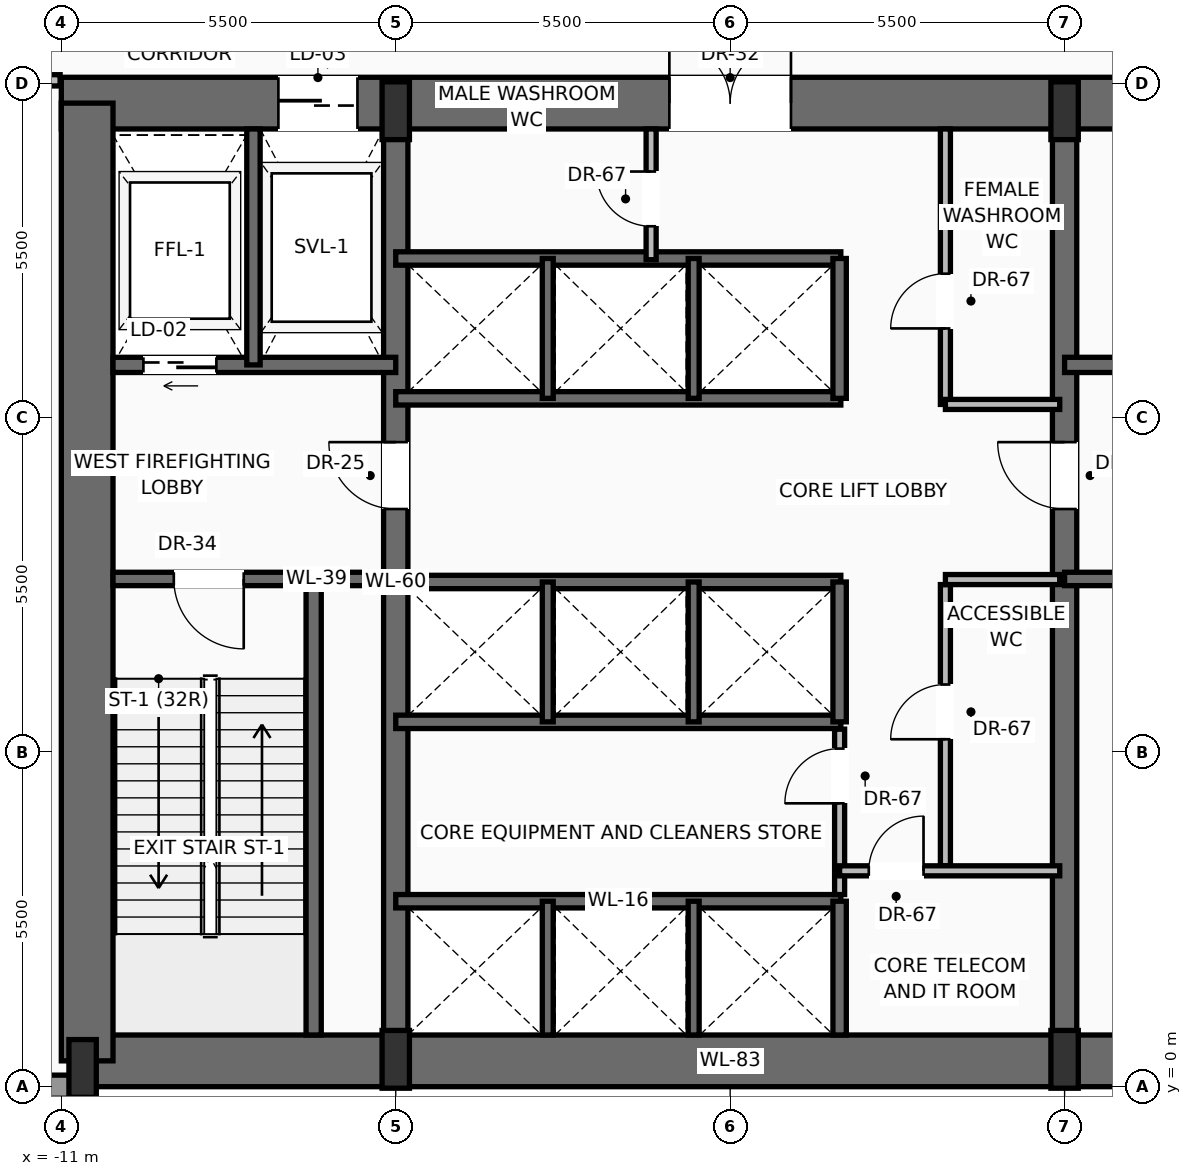
"""IFC4 building model, lengths in metres.
Left out: names, types, materials, properties, quantities, classifications, styles, units other than length and angle.
Written with IfcOpenShell. Run it as: python <this file> out.ifc"""

import sys

from ifc_helpers import new_model, si_unit, direction, frame, frame_2d, origin, origin_2d, place, context, subcontext, project, spatial, rectangle, extrude, source, transform, mapped, element, fill, save


model = new_model("IFC4")
c1 = context("Model", 3, precision=1e-05, world=origin(), true_north=direction((0.0, 1.0)))
c2 = subcontext(c1, "Body", "Model", "MODEL_VIEW")
j1 = project(units=[si_unit("LENGTHUNIT", "METRE"), si_unit("PLANEANGLEUNIT", "RADIAN")], contexts=[c1])
p1 = place(None, origin())
s1 = spatial("IfcSite", under=j1, at=p1, CompositionType="ELEMENT")
p2 = place(p1, origin())
s2 = spatial("IfcBuilding", under=s1, at=p2, CompositionType="ELEMENT")
p3 = place(p2, frame((0.0, 0.0, 11.0)))
s3 = spatial("IfcBuildingStorey", under=s2, at=p3, CompositionType="ELEMENT", Elevation=11.0)
p4 = place(p3, frame((-10.65, 0.425, 0.0), z_axis=(0.0, 0.0, 1.0), x_axis=(1.0, 0.0, 0.0)))
e1 = element("IfcWall", 1, at=p4, inside=s3, PredefinedType="SHEAR", context=c2, shape_type="SweptSolid", body=[
    extrude(rectangle(XDim=21.3, YDim=0.85, at=frame_2d((10.65, 0.0))), origin(), (0.0, 0.0, 1.0), 5.185),
])
p5 = place(p3, frame((-11.0, 16.175, 0.0), z_axis=(0.0, 0.0, 1.0), x_axis=(1.0, 0.0, 0.0)))
e2 = element("IfcWall", 2, at=p5, inside=s3, PredefinedType="SHEAR", context=c2, shape_type="SweptSolid", body=[
    extrude(rectangle(XDim=22.0, YDim=0.85, at=frame_2d((11.0, 0.0))), origin(), (0.0, 0.0, 1.0), 5.185),
])
p6 = place(p5, frame((3.57, 0.0, 0.0)))
e3 = element("IfcOpeningElement", 3, at=p6, cuts=e2, PredefinedType="OPENING", context=c2, shape_type="SweptSolid", body=[
    extrude(rectangle(XDim=1.3, YDim=2.3, at=frame_2d((0.65, 1.15))), frame((0.0, 0.435, 0.0), z_axis=(0.0, -1.0, 0.0), x_axis=(1.0, 0.0, 0.0)), (0.0, 0.0, 1.0), 0.87),
])
p7 = place(p5, frame((10.0, 0.0, 0.0)))
e4 = element("IfcOpeningElement", 4, at=p7, cuts=e2, PredefinedType="OPENING", context=c2, shape_type="SweptSolid", body=[
    extrude(rectangle(XDim=2.0, YDim=2.4, at=frame_2d((1.0, 1.2))), frame((0.0, 0.435, 0.0), z_axis=(0.0, -1.0, 0.0), x_axis=(1.0, 0.0, 0.0)), (0.0, 0.0, 1.0), 0.87),
])
p8 = place(p3, frame((-10.575, 0.425, 0.0), z_axis=(0.0, 0.0, 1.0), x_axis=(0.0, 1.0, 0.0)))
e5 = element("IfcWall", 5, at=p8, inside=s3, PredefinedType="SHEAR", context=c2, shape_type="SweptSolid", body=[
    extrude(rectangle(XDim=15.75, YDim=0.85, at=frame_2d((7.875, 0.0))), origin(), (0.0, 0.0, 1.0), 5.185),
])
p9 = place(p3, frame((-5.5, 0.425, 0.0), z_axis=(0.0, 0.0, 1.0), x_axis=(0.0, 1.0, 0.0)))
e6 = element("IfcWall", 6, at=p9, inside=s3, PredefinedType="SHEAR", context=c2, shape_type="SweptSolid", body=[
    extrude(rectangle(XDim=15.75, YDim=0.4, at=frame_2d((7.875, 0.0))), origin(), (0.0, 0.0, 1.0), 5.185),
])
p10 = place(p9, frame((9.075, 0.0, 0.0)))
e7 = element("IfcOpeningElement", 7, at=p10, cuts=e6, PredefinedType="OPENING", context=c2, shape_type="SweptSolid", body=[
    extrude(rectangle(XDim=1.1, YDim=2.2, at=frame_2d((0.55, 1.1))), frame((0.0, 0.21, 0.0), z_axis=(0.0, -1.0, 0.0), x_axis=(1.0, 0.0, 0.0)), (0.0, 0.0, 1.0), 0.42),
])
p11 = place(p3, frame((5.5, 0.425, 0.0), z_axis=(0.0, 0.0, 1.0), x_axis=(0.0, 1.0, 0.0)))
e8 = element("IfcWall", 8, at=p11, inside=s3, PredefinedType="SHEAR", context=c2, shape_type="SweptSolid", body=[
    extrude(rectangle(XDim=15.75, YDim=0.4, at=frame_2d((7.875, 0.0))), origin(), (0.0, 0.0, 1.0), 5.185),
])
p12 = place(p11, frame((9.075, 0.0, 0.0)))
e9 = element("IfcOpeningElement", 9, at=p12, cuts=e8, PredefinedType="OPENING", context=c2, shape_type="SweptSolid", body=[
    extrude(rectangle(XDim=1.1, YDim=2.2, at=frame_2d((0.55, 1.1))), frame((0.0, 0.21, 0.0), z_axis=(0.0, -1.0, 0.0), x_axis=(1.0, 0.0, 0.0)), (0.0, 0.0, 1.0), 0.42),
])
m1 = source(origin(), c2, "Body", "SweptSolid", [
    extrude(rectangle(XDim=0.45, YDim=0.95, at=origin_2d()), origin(), (0.0, 0.0, 1.0), 5.5),
])
for number, where, z_axis, x_axis in (
    (10, (-10.65, 0.3, 0.0), (0.0, 0.0, 1.0), (1.0, 0.0, 0.0)),
    (11, (-5.5, 0.45, 0.0), (0.0, 0.0, 1.0), (1.0, 0.0, 0.0)),
    (12, (5.5, 0.45, 0.0), (0.0, 0.0, 1.0), (1.0, 0.0, 0.0)),
    (13, (-5.5, 16.05, 0.0), (0.0, 0.0, 1.0), (1.0, 0.0, 0.0)),
    (14, (5.5, 16.05, 0.0), (0.0, 0.0, 1.0), (1.0, 0.0, 0.0)),
):
    element("IfcColumn", number, at=place(p3, frame(where, z_axis=z_axis, x_axis=x_axis)), inside=s3, PredefinedType="PILASTER", context=c2, shape_type="MappedRepresentation", body=[
        mapped(m1, transform((0.0, 0.0, 0.0), scale=1.0)),
    ])
p13 = place(p3, frame((-10.55, 0.0, 0.0), z_axis=(0.0, 0.0, 1.0), x_axis=(-1.0, 0.0, 0.0)))
e15 = element("IfcWall", 15, at=p13, inside=s3, PredefinedType="SOLIDWALL", context=c2, shape_type="SweptSolid", body=[
    extrude(rectangle(XDim=16.85, YDim=0.38, at=frame_2d((8.425, 0.0))), origin(), (0.0, 0.0, 1.0), 4.125),
])
p14 = place(p13, frame((7.525, 0.0, 0.95)))
e16 = element("IfcOpeningElement", 16, at=p14, cuts=e15, PredefinedType="OPENING", context=c2, shape_type="SweptSolid", body=[
    extrude(rectangle(XDim=1.8, YDim=2.4, at=frame_2d((0.9, 1.2))), frame((0.0, 0.2, 0.0), z_axis=(0.0, -1.0, 0.0), x_axis=(1.0, 0.0, 0.0)), (0.0, 0.0, 1.0), 0.4),
])
p15 = place(p3, frame((-6.85, 0.85, 0.0), z_axis=(0.0, 0.0, 1.0), x_axis=(0.0, 1.0, 0.0)))
e17 = element("IfcWall", 17, at=p15, inside=s3, PredefinedType="SOLIDWALL", context=c2, shape_type="SweptSolid", body=[
    extrude(rectangle(XDim=7.5, YDim=0.25, at=frame_2d((3.75, 0.0))), origin(), (0.0, 0.0, 1.0), 5.185),
])
p16 = place(p3, frame((-5.5, 8.35, 0.0), z_axis=(0.0, 0.0, 1.0), x_axis=(-1.0, 0.0, 0.0)))
e18 = element("IfcWall", 18, at=p16, inside=s3, PredefinedType="SOLIDWALL", context=c2, shape_type="SweptSolid", body=[
    extrude(rectangle(XDim=4.65, YDim=0.22, at=frame_2d((2.325, 0.0))), origin(), (0.0, 0.0, 1.0), 5.185),
])
p17 = place(p16, frame((2.5, 0.0, 0.0)))
e19 = element("IfcOpeningElement", 19, at=p17, cuts=e18, PredefinedType="OPENING", context=c2, shape_type="SweptSolid", body=[
    extrude(rectangle(XDim=1.15, YDim=2.2, at=frame_2d((0.575, 1.1))), frame((0.0, 0.12, 0.0), z_axis=(0.0, -1.0, 0.0), x_axis=(1.0, 0.0, 0.0)), (0.0, 0.0, 1.0), 0.24),
])
p18 = place(p3, frame((-5.5, 11.87, 0.0), z_axis=(0.0, 0.0, 1.0), x_axis=(-1.0, 0.0, 0.0)))
e20 = element("IfcWall", 20, at=p18, inside=s3, PredefinedType="SOLIDWALL", context=c2, shape_type="SweptSolid", body=[
    extrude(rectangle(XDim=4.65, YDim=0.25, at=frame_2d((2.325, 0.0))), origin(), (0.0, 0.0, 1.0), 5.185),
])
p19 = place(p18, frame((2.95, 0.0, 0.0)))
e21 = element("IfcOpeningElement", 21, at=p19, cuts=e20, PredefinedType="OPENING", context=c2, shape_type="SweptSolid", body=[
    extrude(rectangle(XDim=1.2, YDim=2.25, at=frame_2d((0.6, 1.125))), frame((0.0, 0.135, 0.0), z_axis=(0.0, -1.0, 0.0), x_axis=(1.0, 0.0, 0.0)), (0.0, 0.0, 1.0), 0.27),
])
p20 = place(p3, frame((-7.84, 11.87, 0.0), z_axis=(0.0, 0.0, 1.0), x_axis=(0.0, 1.0, 0.0)))
e22 = element("IfcWall", 22, at=p20, inside=s3, PredefinedType="SOLIDWALL", context=c2, shape_type="SweptSolid", body=[
    extrude(rectangle(XDim=3.88, YDim=0.22, at=frame_2d((1.94, 0.0))), origin(), (0.0, 0.0, 1.0), 5.185),
])
p21 = place(p3, frame((10.15, 8.35, 0.0), z_axis=(0.0, 0.0, 1.0), x_axis=(-1.0, 0.0, 0.0)))
e23 = element("IfcWall", 23, at=p21, inside=s3, PredefinedType="SOLIDWALL", context=c2, shape_type="SweptSolid", body=[
    extrude(rectangle(XDim=4.65, YDim=0.22, at=frame_2d((2.325, 0.0))), origin(), (0.0, 0.0, 1.0), 5.185),
])
p22 = place(p21, frame((1.0, 0.0, 0.0)))
e24 = element("IfcOpeningElement", 24, at=p22, cuts=e23, PredefinedType="OPENING", context=c2, shape_type="SweptSolid", body=[
    extrude(rectangle(XDim=1.15, YDim=2.2, at=frame_2d((0.575, 1.1))), frame((0.0, 0.12, 0.0), z_axis=(0.0, -1.0, 0.0), x_axis=(1.0, 0.0, 0.0)), (0.0, 0.0, 1.0), 0.24),
])
p23 = place(p3, frame((10.15, 11.87, 0.0), z_axis=(0.0, 0.0, 1.0), x_axis=(-1.0, 0.0, 0.0)))
e25 = element("IfcWall", 25, at=p23, inside=s3, PredefinedType="SOLIDWALL", context=c2, shape_type="SweptSolid", body=[
    extrude(rectangle(XDim=4.65, YDim=0.25, at=frame_2d((2.325, 0.0))), origin(), (0.0, 0.0, 1.0), 5.185),
])
p24 = place(p23, frame((0.5, 0.0, 0.0)))
e26 = element("IfcOpeningElement", 26, at=p24, cuts=e25, PredefinedType="OPENING", context=c2, shape_type="SweptSolid", body=[
    extrude(rectangle(XDim=1.2, YDim=2.25, at=frame_2d((0.6, 1.125))), frame((0.0, 0.135, 0.0), z_axis=(0.0, -1.0, 0.0), x_axis=(1.0, 0.0, 0.0)), (0.0, 0.0, 1.0), 0.27),
])
p25 = place(p3, frame((-5.5, 3.05, 0.0), z_axis=(0.0, 0.0, 1.0), x_axis=(1.0, 0.0, 0.0)))
e27 = element("IfcWall", 27, at=p25, inside=s3, PredefinedType="SOLIDWALL", context=c2, shape_type="SweptSolid", body=[
    extrude(rectangle(XDim=7.32, YDim=0.22, at=frame_2d((3.66, 0.0))), origin(), (0.0, 0.0, 1.0), 5.185),
])
p26 = place(p3, frame((1.8, 0.85, 0.0), z_axis=(0.0, 0.0, 1.0), x_axis=(0.0, 1.0, 0.0)))
e28 = element("IfcWall", 28, at=p26, inside=s3, PredefinedType="SOLIDWALL", context=c2, shape_type="SweptSolid", body=[
    extrude(rectangle(XDim=2.2, YDim=0.22, at=frame_2d((1.1, 0.0))), origin(), (0.0, 0.0, 1.0), 5.185),
])
for number, where, z_axis, x_axis in (
    (29, (-3.0, 0.85, 0.0), (0.0, 0.0, 1.0), (0.0, 1.0, 0.0)),
    (30, (-0.6, 0.85, 0.0), (0.0, 0.0, 1.0), (0.0, 1.0, 0.0)),
):
    element("IfcWall", number, at=place(p3, frame(where, z_axis=z_axis, x_axis=x_axis)), inside=s3, PredefinedType="SOLIDWALL", context=c2, shape_type="SweptSolid", body=[
        extrude(rectangle(XDim=2.2, YDim=0.18, at=frame_2d((1.1, 0.0))), origin(), (0.0, 0.0, 1.0), 5.185),
    ])
p27 = place(p3, frame((1.8, 3.16, 0.0), z_axis=(0.0, 0.0, 1.0), x_axis=(0.0, 1.0, 0.0)))
e31 = element("IfcWall", 31, at=p27, inside=s3, PredefinedType="PARTITIONING", context=c2, shape_type="SweptSolid", body=[
    extrude(rectangle(XDim=2.72, YDim=0.165, at=frame_2d((1.36, 0.0))), origin(), (0.0, 0.0, 1.0), 5.177),
])
p28 = place(p27, frame((1.5, 0.0, 0.0)))
e32 = element("IfcOpeningElement", 32, at=p28, cuts=e31, PredefinedType="OPENING", context=c2, shape_type="SweptSolid", body=[
    extrude(rectangle(XDim=0.9, YDim=2.1, at=frame_2d((0.45, 1.05))), frame((0.0, 0.093, 0.0), z_axis=(0.0, -1.0, 0.0), x_axis=(1.0, 0.0, 0.0)), (0.0, 0.0, 1.0), 0.185),
])
p29 = place(p3, frame((3.54, 3.633, 0.0), z_axis=(0.0, 0.0, 1.0), x_axis=(0.0, 1.0, 0.0)))
e33 = element("IfcWall", 33, at=p29, inside=s3, PredefinedType="PARTITIONING", context=c2, shape_type="SweptSolid", body=[
    extrude(rectangle(XDim=4.625, YDim=0.165, at=frame_2d((2.312, 0.0))), origin(), (0.0, 0.0, 1.0), 5.177),
])
p30 = place(p29, frame((2.081, 0.0, 0.0)))
e34 = element("IfcOpeningElement", 34, at=p30, cuts=e33, PredefinedType="OPENING", context=c2, shape_type="SweptSolid", body=[
    extrude(rectangle(XDim=0.9, YDim=2.1, at=frame_2d((0.45, 1.05))), frame((0.0, 0.093, 0.0), z_axis=(0.0, -1.0, 0.0), x_axis=(1.0, 0.0, 0.0)), (0.0, 0.0, 1.0), 0.185),
])
p31 = place(p3, frame((3.54, 8.34, 0.0), z_axis=(0.0, 0.0, 1.0), x_axis=(1.0, 0.0, 0.0)))
e35 = element("IfcWall", 35, at=p31, inside=s3, PredefinedType="PARTITIONING", context=c2, shape_type="SweptSolid", body=[
    extrude(rectangle(XDim=1.88, YDim=0.165, at=frame_2d((0.94, 0.0))), origin(), (0.0, 0.0, 1.0), 5.177),
])
p32 = place(p3, frame((1.8, 3.55, 0.0), z_axis=(0.0, 0.0, 1.0), x_axis=(1.0, 0.0, 0.0)))
e36 = element("IfcWall", 36, at=p32, inside=s3, PredefinedType="PARTITIONING", context=c2, shape_type="SweptSolid", body=[
    extrude(rectangle(XDim=3.62, YDim=0.165, at=frame_2d((1.81, 0.0))), origin(), (0.0, 0.0, 1.0), 5.177),
])
p33 = place(p32, frame((0.48, 0.0, 0.0)))
e37 = element("IfcOpeningElement", 37, at=p33, cuts=e36, PredefinedType="OPENING", context=c2, shape_type="SweptSolid", body=[
    extrude(rectangle(XDim=0.9, YDim=2.1, at=frame_2d((0.45, 1.05))), frame((0.0, 0.093, 0.0), z_axis=(0.0, -1.0, 0.0), x_axis=(1.0, 0.0, 0.0)), (0.0, 0.0, 1.0), 0.185),
])
for number, where, z_axis, x_axis in (
    (38, (-5.5, 6.0, 0.0), (0.0, 0.0, 1.0), (1.0, 0.0, 0.0)),
    (39, (-5.5, 8.3, 0.0), (0.0, 0.0, 1.0), (1.0, 0.0, 0.0)),
):
    element("IfcWall", number, at=place(p3, frame(where, z_axis=z_axis, x_axis=x_axis)), inside=s3, PredefinedType="SOLIDWALL", context=c2, shape_type="SweptSolid", body=[
        extrude(rectangle(XDim=7.32, YDim=0.22, at=frame_2d((3.66, 0.0))), origin(), (0.0, 0.0, 1.0), 5.185),
    ])
p34 = place(p3, frame((1.8, 6.0, 0.0), z_axis=(0.0, 0.0, 1.0), x_axis=(0.0, 1.0, 0.0)))
e40 = element("IfcWall", 40, at=p34, inside=s3, PredefinedType="SOLIDWALL", context=c2, shape_type="SweptSolid", body=[
    extrude(rectangle(XDim=2.3, YDim=0.22, at=frame_2d((1.15, 0.0))), origin(), (0.0, 0.0, 1.0), 5.185),
])
for number, where, z_axis, x_axis in (
    (41, (-3.0, 6.0, 0.0), (0.0, 0.0, 1.0), (0.0, 1.0, 0.0)),
    (42, (-0.6, 6.0, 0.0), (0.0, 0.0, 1.0), (0.0, 1.0, 0.0)),
):
    element("IfcWall", number, at=place(p3, frame(where, z_axis=z_axis, x_axis=x_axis)), inside=s3, PredefinedType="SOLIDWALL", context=c2, shape_type="SweptSolid", body=[
        extrude(rectangle(XDim=2.3, YDim=0.18, at=frame_2d((1.15, 0.0))), origin(), (0.0, 0.0, 1.0), 5.185),
    ])
for number, where, z_axis, x_axis in (
    (43, (-5.5, 11.32, 0.0), (0.0, 0.0, 1.0), (1.0, 0.0, 0.0)),
    (44, (-5.5, 13.62, 0.0), (0.0, 0.0, 1.0), (1.0, 0.0, 0.0)),
):
    element("IfcWall", number, at=place(p3, frame(where, z_axis=z_axis, x_axis=x_axis)), inside=s3, PredefinedType="SOLIDWALL", context=c2, shape_type="SweptSolid", body=[
        extrude(rectangle(XDim=7.32, YDim=0.22, at=frame_2d((3.66, 0.0))), origin(), (0.0, 0.0, 1.0), 5.185),
    ])
p35 = place(p3, frame((1.8, 11.32, 0.0), z_axis=(0.0, 0.0, 1.0), x_axis=(0.0, 1.0, 0.0)))
e45 = element("IfcWall", 45, at=p35, inside=s3, PredefinedType="SOLIDWALL", context=c2, shape_type="SweptSolid", body=[
    extrude(rectangle(XDim=2.3, YDim=0.22, at=frame_2d((1.15, 0.0))), origin(), (0.0, 0.0, 1.0), 5.185),
])
for number, where, z_axis, x_axis in (
    (46, (-3.0, 11.32, 0.0), (0.0, 0.0, 1.0), (0.0, 1.0, 0.0)),
    (47, (-0.6, 11.32, 0.0), (0.0, 0.0, 1.0), (0.0, 1.0, 0.0)),
):
    element("IfcWall", number, at=place(p3, frame(where, z_axis=z_axis, x_axis=x_axis)), inside=s3, PredefinedType="SOLIDWALL", context=c2, shape_type="SweptSolid", body=[
        extrude(rectangle(XDim=2.3, YDim=0.18, at=frame_2d((1.15, 0.0))), origin(), (0.0, 0.0, 1.0), 5.185),
    ])
p36 = place(p3, frame((-1.3, 13.6, 0.0), z_axis=(0.0, 0.0, 1.0), x_axis=(0.0, 1.0, 0.0)))
e48 = element("IfcWall", 48, at=p36, inside=s3, PredefinedType="PARTITIONING", context=c2, shape_type="SweptSolid", body=[
    extrude(rectangle(XDim=2.15, YDim=0.165, at=frame_2d((1.075, 0.0))), origin(), (0.0, 0.0, 1.0), 5.177),
])
p37 = place(p36, frame((0.55, 0.0, 0.0)))
e49 = element("IfcOpeningElement", 49, at=p37, cuts=e48, PredefinedType="OPENING", context=c2, shape_type="SweptSolid", body=[
    extrude(rectangle(XDim=0.9, YDim=2.1, at=frame_2d((0.45, 1.05))), frame((0.0, 0.093, 0.0), z_axis=(0.0, -1.0, 0.0), x_axis=(1.0, 0.0, 0.0)), (0.0, 0.0, 1.0), 0.185),
])
p38 = place(p3, frame((3.54, 11.22, 0.0), z_axis=(0.0, 0.0, 1.0), x_axis=(0.0, 1.0, 0.0)))
e50 = element("IfcWall", 50, at=p38, inside=s3, PredefinedType="PARTITIONING", context=c2, shape_type="SweptSolid", body=[
    extrude(rectangle(XDim=4.53, YDim=0.165, at=frame_2d((2.265, 0.0))), origin(), (0.0, 0.0, 1.0), 5.177),
])
p39 = place(p38, frame((1.25, 0.0, 0.0)))
e51 = element("IfcOpeningElement", 51, at=p39, cuts=e50, PredefinedType="OPENING", context=c2, shape_type="SweptSolid", body=[
    extrude(rectangle(XDim=0.9, YDim=2.1, at=frame_2d((0.45, 1.05))), frame((0.0, 0.093, 0.0), z_axis=(0.0, -1.0, 0.0), x_axis=(1.0, 0.0, 0.0)), (0.0, 0.0, 1.0), 0.185),
])
p40 = place(p3, frame((3.54, 11.22, 0.0), z_axis=(0.0, 0.0, 1.0), x_axis=(1.0, 0.0, 0.0)))
e52 = element("IfcWall", 52, at=p40, inside=s3, PredefinedType="PARTITIONING", context=c2, shape_type="SweptSolid", body=[
    extrude(rectangle(XDim=1.88, YDim=0.165, at=frame_2d((0.94, 0.0))), origin(), (0.0, 0.0, 1.0), 5.177),
])
p41 = place(p3, frame((-22.5, 16.55, 0.0), z_axis=(0.0, 0.0, 1.0), x_axis=(1.0, 0.0, 0.0)))
e53 = element("IfcWall", 53, at=p41, inside=s3, PredefinedType="PARTITIONING", context=c2, shape_type="SweptSolid", body=[
    extrude(rectangle(XDim=11.48, YDim=0.185, at=frame_2d((5.74, 0.0))), origin(), (0.0, 0.0, 1.0), 4.137),
])
p42 = place(p41, frame((5.265, 0.0, 0.0)))
e54 = element("IfcOpeningElement", 54, at=p42, cuts=e53, PredefinedType="OPENING", context=c2, shape_type="SweptSolid", body=[
    extrude(rectangle(XDim=0.95, YDim=2.2, at=frame_2d((0.475, 1.1))), frame((0.0, 0.103, 0.0), z_axis=(0.0, -1.0, 0.0), x_axis=(1.0, 0.0, 0.0)), (0.0, 0.0, 1.0), 0.205),
])
m2 = source(origin(), c2, "Body", "SweptSolid", [
    extrude(rectangle(XDim=1.15, YDim=2.2, at=frame_2d((0.575, 1.1))), frame((0.0, 0.025, 0.0), z_axis=(0.0, -1.0, 0.0), x_axis=(1.0, 0.0, 0.0)), (0.0, 0.0, 1.0), 0.05),
])
p43 = place(p17, origin())
e55 = element("IfcDoor", 55, at=p43, inside=s3, OperationType="SINGLE_SWING_LEFT", PredefinedType="DOOR", context=c2, shape_type="MappedRepresentation", body=[
    mapped(m2, transform((0.0, 0.0, 0.0), scale=1.0)),
])
fill(e19, e55)
m3 = source(origin(), c2, "Body", "SweptSolid", [
    extrude(rectangle(XDim=1.1, YDim=2.2, at=frame_2d((0.55, 1.1))), frame((0.0, 0.025, 0.0), z_axis=(0.0, -1.0, 0.0), x_axis=(1.0, 0.0, 0.0)), (0.0, 0.0, 1.0), 0.05),
])
p44 = place(p10, origin())
e56 = element("IfcDoor", 56, at=p44, inside=s3, OperationType="SINGLE_SWING_RIGHT", PredefinedType="DOOR", context=c2, shape_type="MappedRepresentation", body=[
    mapped(m3, transform((0.0, 0.0, 0.0), scale=1.0)),
])
fill(e7, e56)
m4 = source(origin(), c2, "Body", "SweptSolid", [
    extrude(rectangle(XDim=1.2, YDim=2.25, at=frame_2d((0.6, 1.125))), frame((0.0, 0.025, 0.0), z_axis=(0.0, -1.0, 0.0), x_axis=(1.0, 0.0, 0.0)), (0.0, 0.0, 1.0), 0.05),
])
p45 = place(p19, origin())
e57 = element("IfcDoor", 57, at=p45, inside=s3, OperationType="SLIDING_TO_LEFT", PredefinedType="DOOR", context=c2, shape_type="MappedRepresentation", body=[
    mapped(m4, transform((0.0, 0.0, 0.0), scale=1.0)),
])
fill(e21, e57)
m5 = source(origin(), c2, "Body", "SweptSolid", [
    extrude(rectangle(XDim=1.3, YDim=2.3, at=frame_2d((0.65, 1.15))), frame((0.0, 0.025, 0.0), z_axis=(0.0, -1.0, 0.0), x_axis=(1.0, 0.0, 0.0)), (0.0, 0.0, 1.0), 0.05),
])
p46 = place(p6, origin())
e58 = element("IfcDoor", 58, at=p46, inside=s3, OperationType="SLIDING_TO_RIGHT", PredefinedType="DOOR", context=c2, shape_type="MappedRepresentation", body=[
    mapped(m5, transform((0.0, 0.0, 0.0), scale=1.0)),
])
fill(e3, e58)
p47 = place(p12, origin())
e59 = element("IfcDoor", 59, at=p47, inside=s3, OperationType="SINGLE_SWING_RIGHT", PredefinedType="DOOR", context=c2, shape_type="MappedRepresentation", body=[
    mapped(m3, transform((0.0, 0.0, 0.0), scale=1.0)),
])
fill(e9, e59)
m6 = source(origin(), c2, "Body", "SweptSolid", [
    extrude(rectangle(XDim=2.0, YDim=2.4, at=frame_2d((1.0, 1.2))), frame((0.0, 0.025, 0.0), z_axis=(0.0, -1.0, 0.0), x_axis=(1.0, 0.0, 0.0)), (0.0, 0.0, 1.0), 0.05),
])
p48 = place(p7, origin())
e60 = element("IfcDoor", 60, at=p48, inside=s3, OperationType="DOUBLE_DOOR_SINGLE_SWING", PredefinedType="DOOR", context=c2, shape_type="MappedRepresentation", body=[
    mapped(m6, transform((0.0, 0.0, 0.0), scale=1.0)),
])
fill(e4, e60)
m7 = source(origin(), c2, "Body", "SweptSolid", [
    extrude(rectangle(XDim=0.9, YDim=2.1, at=frame_2d((0.45, 1.05))), frame((0.0, 0.025, 0.0), z_axis=(0.0, -1.0, 0.0), x_axis=(1.0, 0.0, 0.0)), (0.0, 0.0, 1.0), 0.05),
])
p49 = place(p28, origin())
e61 = element("IfcDoor", 61, at=p49, inside=s3, OperationType="SINGLE_SWING_LEFT", PredefinedType="DOOR", context=c2, shape_type="MappedRepresentation", body=[
    mapped(m7, transform((0.0, 0.0, 0.0), scale=1.0)),
])
fill(e32, e61)
p50 = place(p33, origin())
e62 = element("IfcDoor", 62, at=p50, inside=s3, OperationType="SINGLE_SWING_RIGHT", PredefinedType="DOOR", context=c2, shape_type="MappedRepresentation", body=[
    mapped(m7, transform((0.0, 0.0, 0.0), scale=1.0)),
])
fill(e37, e62)
p51 = place(p30, origin())
e63 = element("IfcDoor", 63, at=p51, inside=s3, OperationType="SINGLE_SWING_LEFT", PredefinedType="DOOR", context=c2, shape_type="MappedRepresentation", body=[
    mapped(m7, transform((0.0, 0.0, 0.0), scale=1.0)),
])
fill(e34, e63)
p52 = place(p37, origin())
e64 = element("IfcDoor", 64, at=p52, inside=s3, OperationType="SINGLE_SWING_RIGHT", PredefinedType="DOOR", context=c2, shape_type="MappedRepresentation", body=[
    mapped(m7, transform((0.0, 0.0, 0.0), scale=1.0)),
])
fill(e49, e64)
p53 = place(p39, origin())
e65 = element("IfcDoor", 65, at=p53, inside=s3, OperationType="SINGLE_SWING_LEFT", PredefinedType="DOOR", context=c2, shape_type="MappedRepresentation", body=[
    mapped(m7, transform((0.0, 0.0, 0.0), scale=1.0)),
])
fill(e51, e65)
save(model, sys.argv[1])
